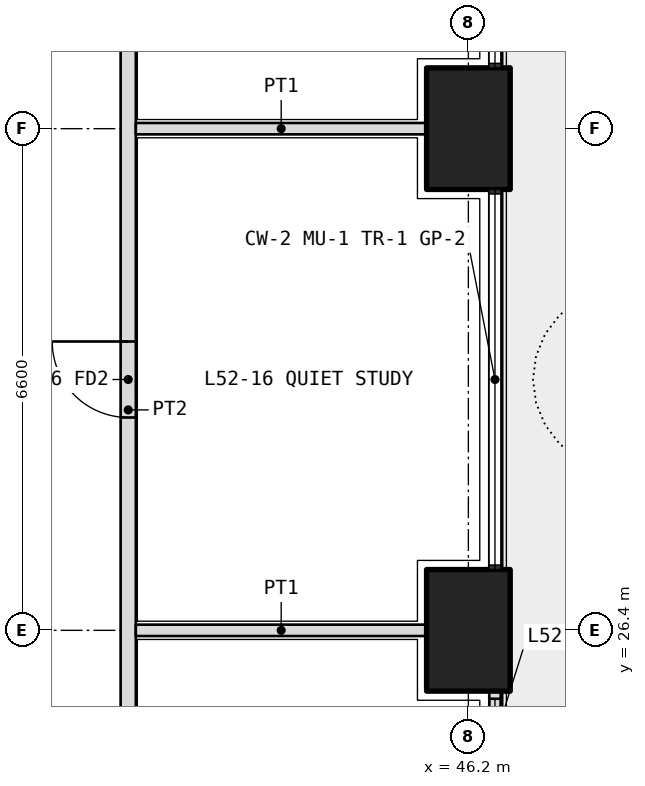
"""IFC4 building model, lengths in metres.
Left out: names, types, materials, properties, quantities, classifications, styles, units other than length and angle.
Written with IfcOpenShell. Run it as: python <this file> out.ifc"""

import sys

from ifc_helpers import new_model, si_unit, direction, frame, frame_2d, origin, origin_2d, place, context, subcontext, project, spatial, rectangle, extrude, element, fill, save


model = new_model("IFC4")
c1 = context("Model", 3, precision=1e-05, world=origin(), true_north=direction((0.0, 1.0)))
c2 = subcontext(c1, "Body", "Model", "MODEL_VIEW")
j1 = project(units=[si_unit("LENGTHUNIT", "METRE"), si_unit("PLANEANGLEUNIT", "RADIAN")], contexts=[c1])
p1 = place(None, origin())
s1 = spatial("IfcSite", under=j1, at=p1, CompositionType="ELEMENT")
p2 = place(p1, origin())
s2 = spatial("IfcBuilding", under=s1, at=p2, CompositionType="ELEMENT")
p3 = place(p2, frame((0.0, 0.0, 229.2)))
s3 = spatial("IfcBuildingStorey", under=s2, at=p3, CompositionType="ELEMENT", Elevation=229.2)
for number, where, z_axis, x_axis in (
    (1, (46.2, 26.4, 0.0), (0.0, 0.0, 1.0), (0.0, 1.0, 0.0)),
    (2, (46.2, 33.0, 0.0), (0.0, 0.0, 1.0), (0.0, 1.0, 0.0)),
):
    element("IfcColumn", number, at=place(p3, frame(where, z_axis=z_axis, x_axis=x_axis)), inside=s3, PredefinedType="COLUMN", context=c2, shape_type="SweptSolid", body=[
        extrude(rectangle(XDim=1.6, YDim=1.1, at=origin_2d()), origin(), (0.0, 0.0, 1.0), 4.2),
    ])
p4 = place(p3, frame((46.55, 20.6, 0.0), z_axis=(0.0, 0.0, 1.0), x_axis=(0.0, 1.0, 0.0)))
e3 = element("IfcWall", 3, at=p4, inside=s3, PredefinedType="SOLIDWALL", context=c2, shape_type="SweptSolid", body=[
    extrude(rectangle(XDim=5.0, YDim=0.15, at=frame_2d((2.5, 0.0))), origin(), (0.0, 0.0, 1.0), 2.7),
])
p5 = place(p4, frame((2.75, 0.0, 0.0)))
e4 = element("IfcOpeningElement", 4, at=p5, cuts=e3, PredefinedType="OPENING", context=c2, shape_type="SweptSolid", body=[
    extrude(rectangle(XDim=1.0, YDim=2.4, at=frame_2d((0.5, 1.2))), frame((0.0, 0.085, 0.0), z_axis=(0.0, -1.0, 0.0), x_axis=(1.0, 0.0, 0.0)), (0.0, 0.0, 1.0), 0.17),
])
p6 = place(p4, frame((0.1, 0.0, 0.1)))
e5 = element("IfcOpeningElement", 5, at=p6, cuts=e3, PredefinedType="OPENING", context=c2, shape_type="SweptSolid", body=[
    extrude(rectangle(XDim=2.15, YDim=2.3, at=frame_2d((1.075, 1.15))), frame((0.0, 0.085, 0.0), z_axis=(0.0, -1.0, 0.0), x_axis=(1.0, 0.0, 0.0)), (0.0, 0.0, 1.0), 0.17),
])
p7 = place(p4, frame((3.85, 0.0, 0.1)))
e6 = element("IfcOpeningElement", 6, at=p7, cuts=e3, PredefinedType="OPENING", context=c2, shape_type="SweptSolid", body=[
    extrude(rectangle(XDim=1.05, YDim=2.3, at=frame_2d((0.525, 1.15))), frame((0.0, 0.085, 0.0), z_axis=(0.0, -1.0, 0.0), x_axis=(1.0, 0.0, 0.0)), (0.0, 0.0, 1.0), 0.17),
])
p8 = place(p3, frame((41.725, 19.8, 0.0), z_axis=(0.0, 0.0, 1.0), x_axis=(0.0, 1.0, 0.0)))
e7 = element("IfcWall", 7, at=p8, inside=s3, PredefinedType="PARTITIONING", context=c2, shape_type="SweptSolid", body=[
    extrude(rectangle(XDim=19.0, YDim=0.2, at=frame_2d((9.5, 0.0))), origin(), (0.0, 0.0, 1.0), 3.0),
])
p9 = place(p8, frame((1.1, 0.0, 0.0)))
e8 = element("IfcOpeningElement", 8, at=p9, cuts=e7, PredefinedType="OPENING", context=c2, shape_type="SweptSolid", body=[
    extrude(rectangle(XDim=1.0, YDim=2.1, at=frame_2d((0.5, 1.05))), frame((0.0, 0.11, 0.0), z_axis=(0.0, -1.0, 0.0), x_axis=(1.0, 0.0, 0.0)), (0.0, 0.0, 1.0), 0.22),
])
p10 = place(p8, frame((4.45, 0.0, 0.0)))
e9 = element("IfcOpeningElement", 9, at=p10, cuts=e7, PredefinedType="OPENING", context=c2, shape_type="SweptSolid", body=[
    extrude(rectangle(XDim=0.9, YDim=2.1, at=frame_2d((0.45, 1.05))), frame((0.0, 0.11, 0.0), z_axis=(0.0, -1.0, 0.0), x_axis=(1.0, 0.0, 0.0)), (0.0, 0.0, 1.0), 0.22),
])
p11 = place(p8, frame((9.4, 0.0, 0.0)))
e10 = element("IfcOpeningElement", 10, at=p11, cuts=e7, PredefinedType="OPENING", context=c2, shape_type="SweptSolid", body=[
    extrude(rectangle(XDim=1.0, YDim=2.1, at=frame_2d((0.5, 1.05))), frame((0.0, 0.11, 0.0), z_axis=(0.0, -1.0, 0.0), x_axis=(1.0, 0.0, 0.0)), (0.0, 0.0, 1.0), 0.22),
])
p12 = place(p8, frame((15.65, 0.0, 0.0)))
e11 = element("IfcOpeningElement", 11, at=p12, cuts=e7, PredefinedType="OPENING", context=c2, shape_type="SweptSolid", body=[
    extrude(rectangle(XDim=1.0, YDim=2.1, at=frame_2d((0.5, 1.05))), frame((0.0, 0.11, 0.0), z_axis=(0.0, -1.0, 0.0), x_axis=(1.0, 0.0, 0.0)), (0.0, 0.0, 1.0), 0.22),
])
for number, where, z_axis, x_axis in (
    (12, (45.65, 26.4, 0.0), (0.0, 0.0, 1.0), (-1.0, 0.0, 0.0)),
    (13, (45.65, 33.0, 0.0), (0.0, 0.0, 1.0), (-1.0, 0.0, 0.0)),
):
    element("IfcWall", number, at=place(p3, frame(where, z_axis=z_axis, x_axis=x_axis)), inside=s3, PredefinedType="PARTITIONING", context=c2, shape_type="SweptSolid", body=[
        extrude(rectangle(XDim=3.825, YDim=0.15, at=frame_2d((1.913, 0.0))), origin(), (0.0, 0.0, 1.0), 3.0),
    ])
p13 = place(p7, origin())
e14 = element("IfcWindow", 14, at=p13, inside=s3, PartitioningType="SINGLE_PANEL", PredefinedType="WINDOW", context=c2, shape_type="SweptSolid", body=[
    extrude(rectangle(XDim=1.05, YDim=2.3, at=frame_2d((0.525, 1.15))), frame((0.0, 0.03, 0.0), z_axis=(0.0, -1.0, 0.0), x_axis=(1.0, 0.0, 0.0)), (0.0, 0.0, 1.0), 0.06),
])
fill(e6, e14)
p14 = place(p11, origin())
e15 = element("IfcDoor", 15, at=p14, inside=s3, OperationType="SINGLE_SWING_RIGHT", PredefinedType="DOOR", context=c2, shape_type="SweptSolid", body=[
    extrude(rectangle(XDim=1.0, YDim=2.1, at=frame_2d((0.5, 1.05))), frame((0.0, 0.025, 0.0), z_axis=(0.0, -1.0, 0.0), x_axis=(1.0, 0.0, 0.0)), (0.0, 0.0, 1.0), 0.05),
])
fill(e10, e15)
save(model, sys.argv[1])
